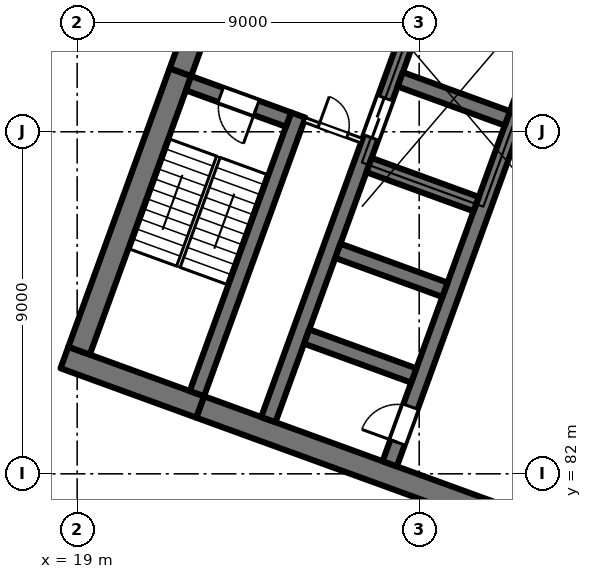
"""IFC4 building model, lengths in metres.
Left out: names, types, materials, properties, quantities, classifications, styles, units other than length and angle.
Written with IfcOpenShell. Run it as: python <this file> out.ifc"""

import sys

from ifc_helpers import new_model, si_unit, direction, frame, frame_2d, origin, place, context, subcontext, project, spatial, rectangle, extrude, element, fill, save


model = new_model("IFC4")
c1 = context("Model", 3, precision=1e-05, world=origin(), true_north=direction((0.0, 1.0)))
c2 = subcontext(c1, "Body", "Model", "MODEL_VIEW")
j1 = project(units=[si_unit("LENGTHUNIT", "METRE"), si_unit("PLANEANGLEUNIT", "RADIAN")], contexts=[c1])
p1 = place(None, origin())
s1 = spatial("IfcSite", under=j1, at=p1, CompositionType="ELEMENT")
p2 = place(p1, origin())
s2 = spatial("IfcBuilding", under=s1, at=p2, CompositionType="ELEMENT")
p3 = place(p2, frame((0.0, 0.0, 117.0)))
s3 = spatial("IfcBuildingStorey", under=s2, at=p3, CompositionType="ELEMENT", Elevation=117.0)
p4 = place(p3, frame((35.767, 78.835, 0.0), z_axis=(0.0, 0.0, 1.0), x_axis=(-0.939692894512, 0.342019391267, 0.0)))
e1 = element("IfcWall", 1, at=p4, inside=s3, PredefinedType="SHEAR", context=c2, shape_type="SweptSolid", body=[
    extrude(rectangle(XDim=14.4, YDim=0.6, at=frame_2d((7.2, 0.0))), origin(), (0.0, 0.0, 1.0), 4.0),
])
p5 = place(p3, frame((22.236, 83.76, 0.0), z_axis=(0.0, 0.0, 1.0), x_axis=(-0.939680822529, 0.342052557032, 0.0)))
e2 = element("IfcWall", 2, at=p5, inside=s3, PredefinedType="SHEAR", context=c2, shape_type="SweptSolid", body=[
    extrude(rectangle(XDim=3.8, YDim=0.6, at=frame_2d((1.9, 0.0))), origin(), (0.0, 0.0, 1.0), 4.0),
])
p6 = place(p3, frame((19.05, 85.239, 0.0), z_axis=(0.0, 0.0, 1.0), x_axis=(0.342016982193, 0.939693771338, 0.0)))
e3 = element("IfcWall", 3, at=p6, inside=s3, PredefinedType="SHEAR", context=c2, shape_type="SweptSolid", body=[
    extrude(rectangle(XDim=7.8, YDim=0.6, at=frame_2d((3.9, 0.0))), origin(), (0.0, 0.0, 1.0), 4.0),
])
p7 = place(p3, frame((21.717, 92.568, 0.0), z_axis=(0.0, 0.0, 1.0), x_axis=(0.342017595281, 0.939693548195, 0.0)))
e4 = element("IfcWall", 4, at=p7, inside=s3, PredefinedType="SHEAR", context=c2, shape_type="SweptSolid", body=[
    extrude(rectangle(XDim=8.925, YDim=0.6, at=frame_2d((4.462, 0.0))), origin(), (0.0, 0.0, 1.0), 4.0),
])
p8 = place(p3, frame((22.15, 84.11, 0.0), z_axis=(0.0, 0.0, 1.0), x_axis=(0.342016982193, 0.939693771338, 0.0)))
e5 = element("IfcWall", 5, at=p8, inside=s3, PredefinedType="SHEAR", context=c2, shape_type="SweptSolid", body=[
    extrude(rectangle(XDim=7.8, YDim=0.4, at=frame_2d((3.9, 0.0))), origin(), (0.0, 0.0, 1.0), 4.0),
])
p9 = place(p3, frame((24.562, 91.32, 0.0), z_axis=(0.0, 0.0, 1.0), x_axis=(-0.939717030584, 0.341953070509, 0.0)))
e6 = element("IfcWall", 6, at=p9, inside=s3, PredefinedType="SHEAR", context=c2, shape_type="SweptSolid", body=[
    extrude(rectangle(XDim=2.8, YDim=0.4, at=frame_2d((1.4, 0.0))), origin(), (0.0, 0.0, 1.0), 4.0),
])
p10 = place(p9, frame((0.9, 0.0, 0.0)))
e7 = element("IfcOpeningElement", 7, at=p10, cuts=e6, PredefinedType="OPENING", context=c2, shape_type="SweptSolid", body=[
    extrude(rectangle(XDim=1.0, YDim=2.1, at=frame_2d((0.5, 1.05))), frame((0.0, 0.21, 0.0), z_axis=(0.0, -1.0, 0.0), x_axis=(1.0, 0.0, 0.0)), (0.0, 0.0, 1.0), 0.42),
])
p11 = place(p3, frame((27.225, 82.263, 0.0), z_axis=(0.0, 0.0, 1.0), x_axis=(0.342014590177, 0.939694641948, 0.0)))
e8 = element("IfcWall", 8, at=p11, inside=s3, PredefinedType="SHEAR", context=c2, shape_type="SweptSolid", body=[
    extrude(rectangle(XDim=12.2, YDim=0.4, at=frame_2d((6.1, 0.0))), origin(), (0.0, 0.0, 1.0), 4.0),
])
p12 = place(p11, frame((10.25, 0.0, 0.0)))
e9 = element("IfcOpeningElement", 9, at=p12, cuts=e8, PredefinedType="OPENING", context=c2, shape_type="SweptSolid", body=[
    extrude(rectangle(XDim=1.1, YDim=2.1, at=frame_2d((0.55, 1.05))), frame((0.0, 0.21, 0.0), z_axis=(0.0, -1.0, 0.0), x_axis=(1.0, 0.0, 0.0)), (0.0, 0.0, 1.0), 0.42),
])
p13 = place(p11, frame((0.6, 0.0, 0.0)))
e10 = element("IfcOpeningElement", 10, at=p13, cuts=e8, PredefinedType="OPENING", context=c2, shape_type="SweptSolid", body=[
    extrude(rectangle(XDim=1.0, YDim=2.1, at=frame_2d((0.5, 1.05))), frame((0.0, 0.21, 0.0), z_axis=(0.0, -1.0, 0.0), x_axis=(1.0, 0.0, 0.0)), (0.0, 0.0, 1.0), 0.42),
])
p14 = place(p3, frame((24.03, 83.426, 0.0), z_axis=(0.0, 0.0, 1.0), x_axis=(0.342014590177, 0.939694641948, 0.0)))
e11 = element("IfcWall", 11, at=p14, inside=s3, PredefinedType="SHEAR", context=c2, shape_type="SweptSolid", body=[
    extrude(rectangle(XDim=12.2, YDim=0.4, at=frame_2d((6.1, 0.0))), origin(), (0.0, 0.0, 1.0), 4.0),
])
p15 = place(p14, frame((7.9, 0.0, 0.0)))
e12 = element("IfcOpeningElement", 12, at=p15, cuts=e11, PredefinedType="OPENING", context=c2, shape_type="SweptSolid", body=[
    extrude(rectangle(XDim=1.1, YDim=2.1, at=frame_2d((0.55, 1.05))), frame((0.0, 0.21, 0.0), z_axis=(0.0, -1.0, 0.0), x_axis=(1.0, 0.0, 0.0)), (0.0, 0.0, 1.0), 0.42),
])
p16 = place(p3, frame((27.858, 84.587, 0.0), z_axis=(0.0, 0.0, 1.0), x_axis=(-0.939686455819, 0.342037080957, 0.0)))
e13 = element("IfcWall", 13, at=p16, inside=s3, PredefinedType="SHEAR", context=c2, shape_type="SweptSolid", body=[
    extrude(rectangle(XDim=3.0, YDim=0.4, at=frame_2d((1.5, 0.0))), origin(), (0.0, 0.0, 1.0), 4.0),
])
p17 = place(p3, frame((28.678, 86.842, 0.0), z_axis=(0.0, 0.0, 1.0), x_axis=(-0.939676934218, 0.342063238742, 0.0)))
e14 = element("IfcWall", 14, at=p17, inside=s3, PredefinedType="SHEAR", context=c2, shape_type="SweptSolid", body=[
    extrude(rectangle(XDim=3.0, YDim=0.4, at=frame_2d((1.5, 0.0))), origin(), (0.0, 0.0, 1.0), 4.0),
])
for number, where, z_axis, x_axis in (
    (15, (29.5, 89.097, 0.0), (0.0, 0.0, 1.0), (-0.94, 0.342, 0.0)),
    (16, (30.32, 91.353, 0.0), (0.0, 0.0, 1.0), (-0.94, 0.342, 0.0)),
):
    element("IfcWall", number, at=place(p3, frame(where, z_axis=z_axis, x_axis=x_axis)), inside=s3, PredefinedType="SHEAR", context=c2, shape_type="SweptSolid", body=[
        extrude(rectangle(XDim=3.0, YDim=0.4, at=frame_2d((1.5, 0.0))), origin(), (0.0, 0.0, 1.0), 4.0),
    ])
p18 = place(p3, frame((24.985, 91.312, 0.0), z_axis=(0.0, 0.0, 1.0), x_axis=(0.939708740826, -0.341975850632, 0.0)))
e17 = element("IfcWall", 17, at=p18, inside=s3, PredefinedType="PARTITIONING", context=c2, shape_type="SweptSolid", body=[
    extrude(rectangle(XDim=1.6, YDim=0.125, at=frame_2d((0.8, 0.0))), origin(), (0.0, 0.0, 1.0), 3.625),
])
p19 = place(p18, frame((0.4, 0.0, 0.0)))
e18 = element("IfcOpeningElement", 18, at=p19, cuts=e17, PredefinedType="OPENING", context=c2, shape_type="SweptSolid", body=[
    extrude(rectangle(XDim=0.8, YDim=2.1, at=frame_2d((0.4, 1.05))), frame((0.0, 0.073, 0.0), z_axis=(0.0, -1.0, 0.0), x_axis=(1.0, 0.0, 0.0)), (0.0, 0.0, 1.0), 0.145),
])
p20 = place(p13, origin())
e19 = element("IfcDoor", 19, at=p20, inside=s3, OperationType="SINGLE_SWING_LEFT", PredefinedType="DOOR", context=c2, shape_type="SweptSolid", body=[
    extrude(rectangle(XDim=1.0, YDim=2.1, at=frame_2d((0.5, 1.05))), frame((0.0, 0.025, 0.0), z_axis=(0.0, -1.0, 0.0), x_axis=(1.0, 0.0, 0.0)), (0.0, 0.0, 1.0), 0.05),
])
fill(e10, e19)
p21 = place(p10, origin())
e20 = element("IfcDoor", 20, at=p21, inside=s3, OperationType="SINGLE_SWING_LEFT", PredefinedType="DOOR", context=c2, shape_type="SweptSolid", body=[
    extrude(rectangle(XDim=1.0, YDim=2.1, at=frame_2d((0.5, 1.05))), frame((0.0, 0.025, 0.0), z_axis=(0.0, -1.0, 0.0), x_axis=(1.0, 0.0, 0.0)), (0.0, 0.0, 1.0), 0.05),
])
fill(e7, e20)
p22 = place(p19, origin())
e21 = element("IfcDoor", 21, at=p22, inside=s3, OperationType="SINGLE_SWING_RIGHT", PredefinedType="DOOR", context=c2, shape_type="SweptSolid", body=[
    extrude(rectangle(XDim=0.8, YDim=2.1, at=frame_2d((0.4, 1.05))), frame((0.0, 0.025, 0.0), z_axis=(0.0, -1.0, 0.0), x_axis=(1.0, 0.0, 0.0)), (0.0, 0.0, 1.0), 0.05),
])
fill(e18, e21)
p23 = place(p15, origin())
e22 = element("IfcDoor", 22, at=p23, inside=s3, OperationType="DOUBLE_DOOR_SLIDING", PredefinedType="DOOR", context=c2, shape_type="SweptSolid", body=[
    extrude(rectangle(XDim=1.1, YDim=2.1, at=frame_2d((0.55, 1.05))), frame((0.0, 0.025, 0.0), z_axis=(0.0, -1.0, 0.0), x_axis=(1.0, 0.0, 0.0)), (0.0, 0.0, 1.0), 0.05),
])
fill(e12, e22)
save(model, sys.argv[1])
